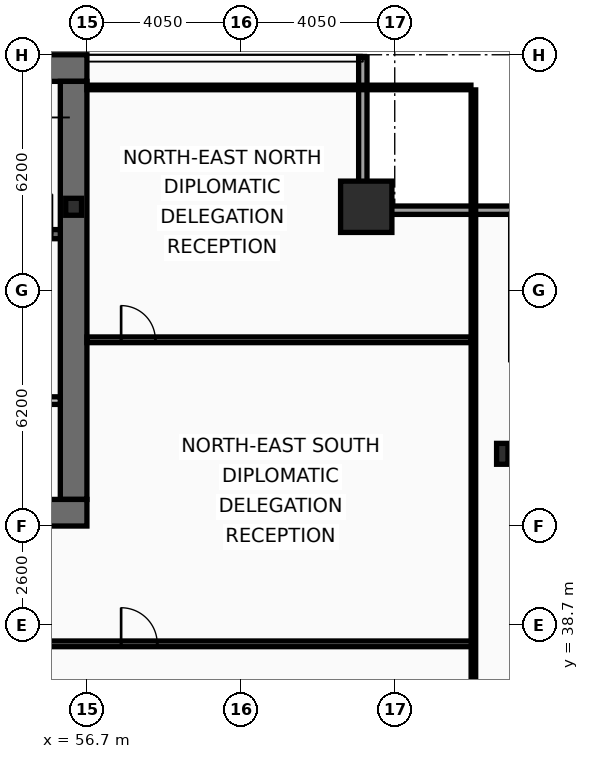
"""IFC4 building model, lengths in metres.
Left out: names, types, materials, properties, quantities, classifications, styles, units other than length and angle.
Written with IfcOpenShell. Run it as: python <this file> out.ifc"""

import sys

from ifc_helpers import new_model, si_unit, direction, frame, frame_2d, origin, origin_2d, place, context, subcontext, project, spatial, rectangle, hollow_rectangle, i_section, extrude, element, fill, save


model = new_model("IFC4")
c1 = context("Model", 3, precision=1e-05, world=origin(), true_north=direction((0.0, 1.0)))
c2 = subcontext(c1, "Body", "Model", "MODEL_VIEW")
j1 = project(units=[si_unit("LENGTHUNIT", "METRE"), si_unit("PLANEANGLEUNIT", "RADIAN")], contexts=[c1])
p1 = place(None, origin())
s1 = spatial("IfcSite", under=j1, at=p1, CompositionType="ELEMENT")
p2 = place(p1, origin())
s2 = spatial("IfcBuilding", under=s1, at=p2, CompositionType="ELEMENT")
p3 = place(p2, frame((0.0, 0.0, 136.2)))
s3 = spatial("IfcBuildingStorey", under=s2, at=p3, CompositionType="ELEMENT", Elevation=136.2)
p4 = place(p3, frame((16.2, 53.35, 0.0), z_axis=(0.0, 0.0, 1.0), x_axis=(1.0, 0.0, 0.0)))
e1 = element("IfcWall", 1, at=p4, inside=s3, PredefinedType="SHEAR", context=c2, shape_type="SweptSolid", body=[
    extrude(rectangle(XDim=40.5, YDim=0.7, at=frame_2d((20.25, 0.0))), origin(), (0.0, 0.0, 1.0), 3.44),
])
p5 = place(p3, frame((56.35, 53.0, 0.0), z_axis=(0.0, 0.0, 1.0), x_axis=(0.0, -1.0, 0.0)))
e2 = element("IfcWall", 2, at=p5, inside=s3, PredefinedType="SHEAR", context=c2, shape_type="SweptSolid", body=[
    extrude(rectangle(XDim=11.0, YDim=0.7, at=frame_2d((5.5, 0.0))), origin(), (0.0, 0.0, 1.0), 3.44),
])
p6 = place(p3, frame((56.7, 41.65, 0.0), z_axis=(0.0, 0.0, 1.0), x_axis=(-1.0, 0.0, 0.0)))
e3 = element("IfcWall", 3, at=p6, inside=s3, PredefinedType="SHEAR", context=c2, shape_type="SweptSolid", body=[
    extrude(rectangle(XDim=2.45, YDim=0.7, at=frame_2d((1.225, 0.0))), origin(), (0.0, 0.0, 1.0), 3.44),
])
p7 = place(p3, frame((48.63, 48.98, 0.0), z_axis=(0.0, 0.0, 1.0), x_axis=(1.0, 0.0, 0.0)))
e4 = element("IfcWall", 4, at=p7, inside=s3, PredefinedType="SHEAR", context=c2, shape_type="SweptSolid", body=[
    extrude(rectangle(XDim=7.37, YDim=0.24, at=frame_2d((3.685, 0.0))), origin(), (0.0, 0.0, 1.0), 3.44),
])
p8 = place(p7, frame((6.1, 0.0, 0.0)))
e5 = element("IfcOpeningElement", 5, at=p8, cuts=e4, PredefinedType="OPENING", context=c2, shape_type="SweptSolid", body=[
    extrude(rectangle(XDim=1.05, YDim=2.15, at=frame_2d((0.525, 1.075))), frame((0.0, 0.13, 0.0), z_axis=(0.0, -1.0, 0.0), x_axis=(1.0, 0.0, 0.0)), (0.0, 0.0, 1.0), 0.26),
])
p9 = place(p3, frame((64.05, 49.7, 0.0), z_axis=(0.0, 0.0, 1.0), x_axis=(1.0, 0.0, 0.0)))
e6 = element("IfcColumn", 6, at=p9, inside=s3, PredefinedType="COLUMN", context=c2, shape_type="SweptSolid", body=[
    extrude(hollow_rectangle(XDim=1.35, YDim=1.35, WallThickness=0.065, at=origin_2d()), origin(), (0.0, 0.0, 1.0), 3.6),
])
p10 = place(p3, frame((67.63, 43.2, 0.0), z_axis=(0.0, 0.0, 1.0), x_axis=(1.0, 0.0, 0.0)))
e7 = element("IfcColumn", 7, at=p10, inside=s3, PredefinedType="COLUMN", context=c2, shape_type="SweptSolid", body=[
    extrude(i_section(OverallWidth=0.3, OverallDepth=0.55, WebThickness=0.015, FlangeThickness=0.029, at=origin_2d()), origin(), (0.0, 0.0, 1.0), 3.6),
])
p11 = place(p3, frame((56.35, 49.7, 0.0), z_axis=(0.0, 0.0, 1.0), x_axis=(1.0, 0.0, 0.0)))
e8 = element("IfcColumn", 8, at=p11, inside=s3, PredefinedType="COLUMN", context=c2, shape_type="SweptSolid", body=[
    extrude(i_section(OverallWidth=0.416, OverallDepth=0.446, WebThickness=0.039, FlangeThickness=0.063, at=origin_2d()), origin(), (0.0, 0.0, 1.0), 3.6),
])
p12 = place(p3, frame((63.96, 53.63, 0.0), z_axis=(0.0, 0.0, 1.0), x_axis=(0.0, -1.0, 0.0)))
e9 = element("IfcWall", 9, at=p12, inside=s3, PredefinedType="SOLIDWALL", context=c2, shape_type="SweptSolid", body=[
    extrude(rectangle(XDim=3.91, YDim=0.22, at=frame_2d((1.955, 0.0))), origin(), (0.0, 0.0, 1.0), 2.83),
])
p13 = place(p3, frame((63.85, 49.61, 0.0), z_axis=(0.0, 0.0, 1.0), x_axis=(1.0, 0.0, 0.0)))
e10 = element("IfcWall", 10, at=p13, inside=s3, PredefinedType="SOLIDWALL", context=c2, shape_type="SweptSolid", body=[
    extrude(rectangle(XDim=4.22, YDim=0.22, at=frame_2d((2.11, 0.0))), origin(), (0.0, 0.0, 1.0), 2.83),
])
p14 = place(p3, frame((51.9, 44.6, 0.0), z_axis=(0.0, 0.0, 1.0), x_axis=(1.0, 0.0, 0.0)))
e11 = element("IfcWall", 11, at=p14, inside=s3, PredefinedType="PARTITIONING", context=c2, shape_type="SweptSolid", body=[
    extrude(rectangle(XDim=4.1, YDim=0.2, at=frame_2d((2.05, 0.0))), origin(), (0.0, 0.0, 1.0), 3.44),
])
p15 = place(p14, frame((1.15, 0.0, 0.0)))
e12 = element("IfcOpeningElement", 12, at=p15, cuts=e11, PredefinedType="OPENING", context=c2, shape_type="SweptSolid", body=[
    extrude(rectangle(XDim=1.05, YDim=2.15, at=frame_2d((0.525, 1.075))), frame((0.0, 0.11, 0.0), z_axis=(0.0, -1.0, 0.0), x_axis=(1.0, 0.0, 0.0)), (0.0, 0.0, 1.0), 0.22),
])
p16 = place(p3, frame((54.35, 38.2, 0.0), z_axis=(0.0, 0.0, 1.0), x_axis=(1.0, 0.0, 0.0)))
e13 = element("IfcWall", 13, at=p16, inside=s3, PredefinedType="PARTITIONING", context=c2, shape_type="SweptSolid", body=[
    extrude(rectangle(XDim=12.52, YDim=0.15, at=frame_2d((6.26, 0.0))), origin(), (0.0, 0.0, 1.0), 2.73),
])
p17 = place(p16, frame((3.25, 0.0, 0.0)))
e14 = element("IfcOpeningElement", 14, at=p17, cuts=e13, PredefinedType="OPENING", context=c2, shape_type="SweptSolid", body=[
    extrude(rectangle(XDim=0.95, YDim=2.05, at=frame_2d((0.475, 1.025))), frame((0.0, 0.085, 0.0), z_axis=(0.0, -1.0, 0.0), x_axis=(1.0, 0.0, 0.0)), (0.0, 0.0, 1.0), 0.17),
])
p18 = place(p3, frame((56.7, 46.2, 0.0), z_axis=(0.0, 0.0, 1.0), x_axis=(1.0, 0.0, 0.0)))
e15 = element("IfcWall", 15, at=p18, inside=s3, PredefinedType="PARTITIONING", context=c2, shape_type="SweptSolid", body=[
    extrude(rectangle(XDim=10.105, YDim=0.15, at=frame_2d((5.052, 0.0))), origin(), (0.0, 0.0, 1.0), 2.83),
])
p19 = place(p18, frame((0.9, 0.0, 0.0)))
e16 = element("IfcOpeningElement", 16, at=p19, cuts=e15, PredefinedType="OPENING", context=c2, shape_type="SweptSolid", body=[
    extrude(rectangle(XDim=0.9, YDim=2.05, at=frame_2d((0.45, 1.025))), frame((0.0, 0.085, 0.0), z_axis=(0.0, -1.0, 0.0), x_axis=(1.0, 0.0, 0.0)), (0.0, 0.0, 1.0), 0.17),
])
p20 = place(p3, frame((66.87, 10.665, 0.0), z_axis=(0.0, 0.0, 1.0), x_axis=(0.0, 1.0, 0.0)))
e17 = element("IfcWall", 17, at=p20, inside=s3, PredefinedType="PARTITIONING", context=c2, shape_type="SweptSolid", body=[
    extrude(rectangle(XDim=42.11, YDim=0.12, at=frame_2d((21.055, 0.0))), origin(), (0.0, 0.0, 1.0), 2.73),
])
p21 = place(p3, frame((56.7, 52.84, 0.0), z_axis=(0.0, 0.0, 1.0), x_axis=(1.0, 0.0, 0.0)))
e18 = element("IfcWall", 18, at=p21, inside=s3, PredefinedType="PARTITIONING", context=c2, shape_type="SweptSolid", body=[
    extrude(rectangle(XDim=10.105, YDim=0.12, at=frame_2d((5.052, 0.0))), origin(), (0.0, 0.0, 1.0), 3.44),
])
p22 = place(p17, origin())
e19 = element("IfcDoor", 19, at=p22, inside=s3, OperationType="SINGLE_SWING_LEFT", PredefinedType="DOOR", context=c2, shape_type="SweptSolid", body=[
    extrude(rectangle(XDim=0.95, YDim=2.05, at=frame_2d((0.475, 1.025))), frame((0.0, 0.025, 0.0), z_axis=(0.0, -1.0, 0.0), x_axis=(1.0, 0.0, 0.0)), (0.0, 0.0, 1.0), 0.05),
])
fill(e14, e19)
p23 = place(p19, origin())
e20 = element("IfcDoor", 20, at=p23, inside=s3, OperationType="SINGLE_SWING_LEFT", PredefinedType="DOOR", context=c2, shape_type="SweptSolid", body=[
    extrude(rectangle(XDim=0.9, YDim=2.05, at=frame_2d((0.45, 1.025))), frame((0.0, 0.025, 0.0), z_axis=(0.0, -1.0, 0.0), x_axis=(1.0, 0.0, 0.0)), (0.0, 0.0, 1.0), 0.05),
])
fill(e16, e20)
save(model, sys.argv[1])
